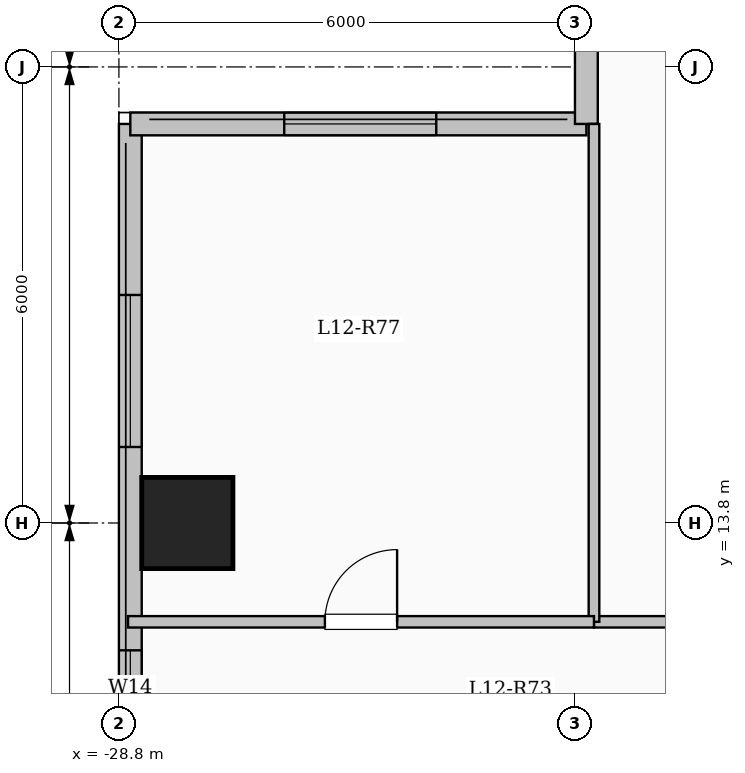
"""IFC4 building model, lengths in metres.
Left out: names, types, materials, properties, quantities, classifications, styles, units other than length and angle.
Written with IfcOpenShell. Run it as: python <this file> out.ifc"""

import sys

from ifc_helpers import new_model, si_unit, direction, frame, frame_2d, origin, origin_2d, place, context, subcontext, project, spatial, rectangle, extrude, element, fill, save


model = new_model("IFC4")
c1 = context("Model", 3, precision=1e-05, world=origin(), true_north=direction((0.0, 1.0)))
c2 = subcontext(c1, "Body", "Model", "MODEL_VIEW")
j1 = project(units=[si_unit("LENGTHUNIT", "METRE"), si_unit("PLANEANGLEUNIT", "RADIAN")], contexts=[c1])
p1 = place(None, origin())
s1 = spatial("IfcSite", under=j1, at=p1, CompositionType="ELEMENT")
p2 = place(p1, origin())
s2 = spatial("IfcBuilding", under=s1, at=p2, CompositionType="ELEMENT")
p3 = place(p2, frame((0.0, 0.0, 47.45)))
s3 = spatial("IfcBuildingStorey", under=s2, at=p3, CompositionType="ELEMENT", Elevation=47.45)
p4 = place(p3, frame((-27.9, 13.8, 0.0), z_axis=(0.0, 0.0, 1.0), x_axis=(1.0, 0.0, 0.0)))
e1 = element("IfcColumn", 1, at=p4, inside=s3, PredefinedType="COLUMN", context=c2, shape_type="SweptSolid", body=[
    extrude(rectangle(XDim=1.2, YDim=1.2, at=origin_2d()), origin(), (0.0, 0.0, 1.0), 3.35),
])
p5 = place(p3, frame((-28.65, -19.05, 0.0), z_axis=(0.0, 0.0, 1.0), x_axis=(0.0, 1.0, 0.0)))
e2 = element("IfcWall", 2, at=p5, inside=s3, PredefinedType="SOLIDWALL", context=c2, shape_type="SweptSolid", body=[
    extrude(rectangle(XDim=38.1, YDim=0.3, at=frame_2d((19.05, 0.0))), origin(), (0.0, 0.0, 1.0), 3.1),
])
p6 = place(p5, frame((3.15, 0.0, 0.9)))
e3 = element("IfcOpeningElement", 3, at=p6, cuts=e2, PredefinedType="OPENING", context=c2, shape_type="SweptSolid", body=[
    extrude(rectangle(XDim=2.4, YDim=1.8, at=frame_2d((1.2, 0.9))), frame((0.0, 0.16, 0.0), z_axis=(0.0, -1.0, 0.0), x_axis=(1.0, 0.0, 0.0)), (0.0, 0.0, 1.0), 0.32),
])
p7 = place(p5, frame((9.542, 0.0, 0.9)))
e4 = element("IfcOpeningElement", 4, at=p7, cuts=e2, PredefinedType="OPENING", context=c2, shape_type="SweptSolid", body=[
    extrude(rectangle(XDim=1.5, YDim=1.65, at=frame_2d((0.75, 0.825))), frame((0.0, 0.16, 0.0), z_axis=(0.0, -1.0, 0.0), x_axis=(1.0, 0.0, 0.0)), (0.0, 0.0, 1.0), 0.32),
])
p8 = place(p5, frame((14.95, 0.0, 0.9)))
e5 = element("IfcOpeningElement", 5, at=p8, cuts=e2, PredefinedType="OPENING", context=c2, shape_type="SweptSolid", body=[
    extrude(rectangle(XDim=2.4, YDim=1.8, at=frame_2d((1.2, 0.9))), frame((0.0, 0.16, 0.0), z_axis=(0.0, -1.0, 0.0), x_axis=(1.0, 0.0, 0.0)), (0.0, 0.0, 1.0), 0.32),
])
p9 = place(p5, frame((21.375, 0.0, 0.9)))
e6 = element("IfcOpeningElement", 6, at=p9, cuts=e2, PredefinedType="OPENING", context=c2, shape_type="SweptSolid", body=[
    extrude(rectangle(XDim=1.8, YDim=1.65, at=frame_2d((0.9, 0.825))), frame((0.0, 0.16, 0.0), z_axis=(0.0, -1.0, 0.0), x_axis=(1.0, 0.0, 0.0)), (0.0, 0.0, 1.0), 0.32),
])
p10 = place(p5, frame((25.925, 0.0, 0.9)))
e7 = element("IfcOpeningElement", 7, at=p10, cuts=e2, PredefinedType="OPENING", context=c2, shape_type="SweptSolid", body=[
    extrude(rectangle(XDim=2.0, YDim=1.7, at=frame_2d((1.0, 0.85))), frame((0.0, 0.16, 0.0), z_axis=(0.0, -1.0, 0.0), x_axis=(1.0, 0.0, 0.0)), (0.0, 0.0, 1.0), 0.32),
])
p11 = place(p5, frame((30.175, 0.0, 0.95)))
e8 = element("IfcOpeningElement", 8, at=p11, cuts=e2, PredefinedType="OPENING", context=c2, shape_type="SweptSolid", body=[
    extrude(rectangle(XDim=1.0, YDim=1.5, at=frame_2d((0.5, 0.75))), frame((0.0, 0.16, 0.0), z_axis=(0.0, -1.0, 0.0), x_axis=(1.0, 0.0, 0.0)), (0.0, 0.0, 1.0), 0.32),
])
p12 = place(p5, frame((33.85, 0.0, 0.9)))
e9 = element("IfcOpeningElement", 9, at=p12, cuts=e2, PredefinedType="OPENING", context=c2, shape_type="SweptSolid", body=[
    extrude(rectangle(XDim=2.0, YDim=1.7, at=frame_2d((1.0, 0.85))), frame((0.0, 0.16, 0.0), z_axis=(0.0, -1.0, 0.0), x_axis=(1.0, 0.0, 0.0)), (0.0, 0.0, 1.0), 0.32),
])
p13 = place(p3, frame((-28.65, 19.05, 0.0), z_axis=(0.0, 0.0, 1.0), x_axis=(1.0, 0.0, 0.0)))
e10 = element("IfcWall", 10, at=p13, inside=s3, PredefinedType="SOLIDWALL", context=c2, shape_type="SweptSolid", body=[
    extrude(rectangle(XDim=6.0, YDim=0.3, at=frame_2d((3.0, 0.0))), origin(), (0.0, 0.0, 1.0), 3.1),
])
p14 = place(p13, frame((2.025, 0.0, 0.9)))
e11 = element("IfcOpeningElement", 11, at=p14, cuts=e10, PredefinedType="OPENING", context=c2, shape_type="SweptSolid", body=[
    extrude(rectangle(XDim=2.0, YDim=1.7, at=frame_2d((1.0, 0.85))), frame((0.0, 0.16, 0.0), z_axis=(0.0, -1.0, 0.0), x_axis=(1.0, 0.0, 0.0)), (0.0, 0.0, 1.0), 0.32),
])
p15 = place(p3, frame((-22.65, 19.05, 0.0), z_axis=(0.0, 0.0, 1.0), x_axis=(0.0, 1.0, 0.0)))
e12 = element("IfcWall", 12, at=p15, inside=s3, PredefinedType="SOLIDWALL", context=c2, shape_type="SweptSolid", body=[
    extrude(rectangle(XDim=4.5, YDim=0.3, at=frame_2d((2.25, 0.0))), origin(), (0.0, 0.0, 1.0), 3.1),
])
p16 = place(p15, frame((1.232, 0.0, 0.9)))
e13 = element("IfcOpeningElement", 13, at=p16, cuts=e12, PredefinedType="OPENING", context=c2, shape_type="SweptSolid", body=[
    extrude(rectangle(XDim=2.0, YDim=1.7, at=frame_2d((1.0, 0.85))), frame((0.0, 0.16, 0.0), z_axis=(0.0, -1.0, 0.0), x_axis=(1.0, 0.0, 0.0)), (0.0, 0.0, 1.0), 0.32),
])
p17 = place(p3, frame((-22.55, 12.5, 0.0), z_axis=(0.0, 0.0, 1.0), x_axis=(1.0, 0.0, 0.0)))
e14 = element("IfcWall", 14, at=p17, inside=s3, PredefinedType="PARTITIONING", context=c2, shape_type="SweptSolid", body=[
    extrude(rectangle(XDim=18.7, YDim=0.15, at=frame_2d((9.35, 0.0))), origin(), (0.0, 0.0, 1.0), 3.1),
])
p18 = place(p17, frame((2.832, 0.0, 0.0)))
e15 = element("IfcOpeningElement", 15, at=p18, cuts=e14, PredefinedType="OPENING", context=c2, shape_type="SweptSolid", body=[
    extrude(rectangle(XDim=0.95, YDim=2.15, at=frame_2d((0.475, 1.075))), frame((0.0, 0.085, 0.0), z_axis=(0.0, -1.0, 0.0), x_axis=(1.0, 0.0, 0.0)), (0.0, 0.0, 1.0), 0.17),
])
p19 = place(p17, frame((9.537, 0.0, 0.0)))
e16 = element("IfcOpeningElement", 16, at=p19, cuts=e14, PredefinedType="OPENING", context=c2, shape_type="SweptSolid", body=[
    extrude(rectangle(XDim=0.95, YDim=2.15, at=frame_2d((0.475, 1.075))), frame((0.0, 0.085, 0.0), z_axis=(0.0, -1.0, 0.0), x_axis=(1.0, 0.0, 0.0)), (0.0, 0.0, 1.0), 0.17),
])
p20 = place(p17, frame((15.5, 0.0, 0.0)))
e17 = element("IfcOpeningElement", 17, at=p20, cuts=e14, PredefinedType="OPENING", context=c2, shape_type="SweptSolid", body=[
    extrude(rectangle(XDim=0.95, YDim=2.15, at=frame_2d((0.475, 1.075))), frame((0.0, 0.085, 0.0), z_axis=(0.0, -1.0, 0.0), x_axis=(1.0, 0.0, 0.0)), (0.0, 0.0, 1.0), 0.17),
])
p21 = place(p3, frame((-22.55, 12.5, 0.0), z_axis=(0.0, 0.0, 1.0), x_axis=(0.0, 1.0, 0.0)))
e18 = element("IfcWall", 18, at=p21, inside=s3, PredefinedType="PARTITIONING", context=c2, shape_type="SweptSolid", body=[
    extrude(rectangle(XDim=6.55, YDim=0.14, at=frame_2d((3.275, 0.0))), origin(), (0.0, 0.0, 1.0), 3.1),
])
p22 = place(p3, frame((-28.68, 12.5, 0.0), z_axis=(0.0, 0.0, 1.0), x_axis=(1.0, 0.0, 0.0)))
e19 = element("IfcWall", 19, at=p22, inside=s3, PredefinedType="PARTITIONING", context=c2, shape_type="SweptSolid", body=[
    extrude(rectangle(XDim=6.13, YDim=0.15, at=frame_2d((3.065, 0.0))), origin(), (0.0, 0.0, 1.0), 3.1),
])
p23 = place(p22, frame((2.59, 0.0, 0.0)))
e20 = element("IfcOpeningElement", 20, at=p23, cuts=e19, PredefinedType="OPENING", context=c2, shape_type="SweptSolid", body=[
    extrude(rectangle(XDim=0.95, YDim=2.15, at=frame_2d((0.475, 1.075))), frame((0.0, 0.085, 0.0), z_axis=(0.0, -1.0, 0.0), x_axis=(1.0, 0.0, 0.0)), (0.0, 0.0, 1.0), 0.17),
])
p24 = place(p11, origin())
e21 = element("IfcWindow", 21, at=p24, inside=s3, PartitioningType="SINGLE_PANEL", PredefinedType="WINDOW", context=c2, shape_type="SweptSolid", body=[
    extrude(rectangle(XDim=1.0, YDim=1.5, at=frame_2d((0.5, 0.75))), frame((0.0, 0.03, 0.0), z_axis=(0.0, -1.0, 0.0), x_axis=(1.0, 0.0, 0.0)), (0.0, 0.0, 1.0), 0.06),
])
fill(e8, e21)
p25 = place(p12, origin())
e22 = element("IfcWindow", 22, at=p25, inside=s3, PartitioningType="SINGLE_PANEL", PredefinedType="WINDOW", context=c2, shape_type="SweptSolid", body=[
    extrude(rectangle(XDim=2.0, YDim=1.7, at=frame_2d((1.0, 0.85))), frame((0.0, 0.03, 0.0), z_axis=(0.0, -1.0, 0.0), x_axis=(1.0, 0.0, 0.0)), (0.0, 0.0, 1.0), 0.06),
])
fill(e9, e22)
p26 = place(p14, origin())
e23 = element("IfcWindow", 23, at=p26, inside=s3, PartitioningType="SINGLE_PANEL", PredefinedType="WINDOW", context=c2, shape_type="SweptSolid", body=[
    extrude(rectangle(XDim=2.0, YDim=1.7, at=frame_2d((1.0, 0.85))), frame((0.0, 0.03, 0.0), z_axis=(0.0, -1.0, 0.0), x_axis=(1.0, 0.0, 0.0)), (0.0, 0.0, 1.0), 0.06),
])
fill(e11, e23)
p27 = place(p23, origin())
e24 = element("IfcDoor", 24, at=p27, inside=s3, OperationType="SINGLE_SWING_RIGHT", PredefinedType="DOOR", context=c2, shape_type="SweptSolid", body=[
    extrude(rectangle(XDim=0.95, YDim=2.15, at=frame_2d((0.475, 1.075))), frame((0.0, 0.025, 0.0), z_axis=(0.0, -1.0, 0.0), x_axis=(1.0, 0.0, 0.0)), (0.0, 0.0, 1.0), 0.05),
])
fill(e20, e24)
save(model, sys.argv[1])
